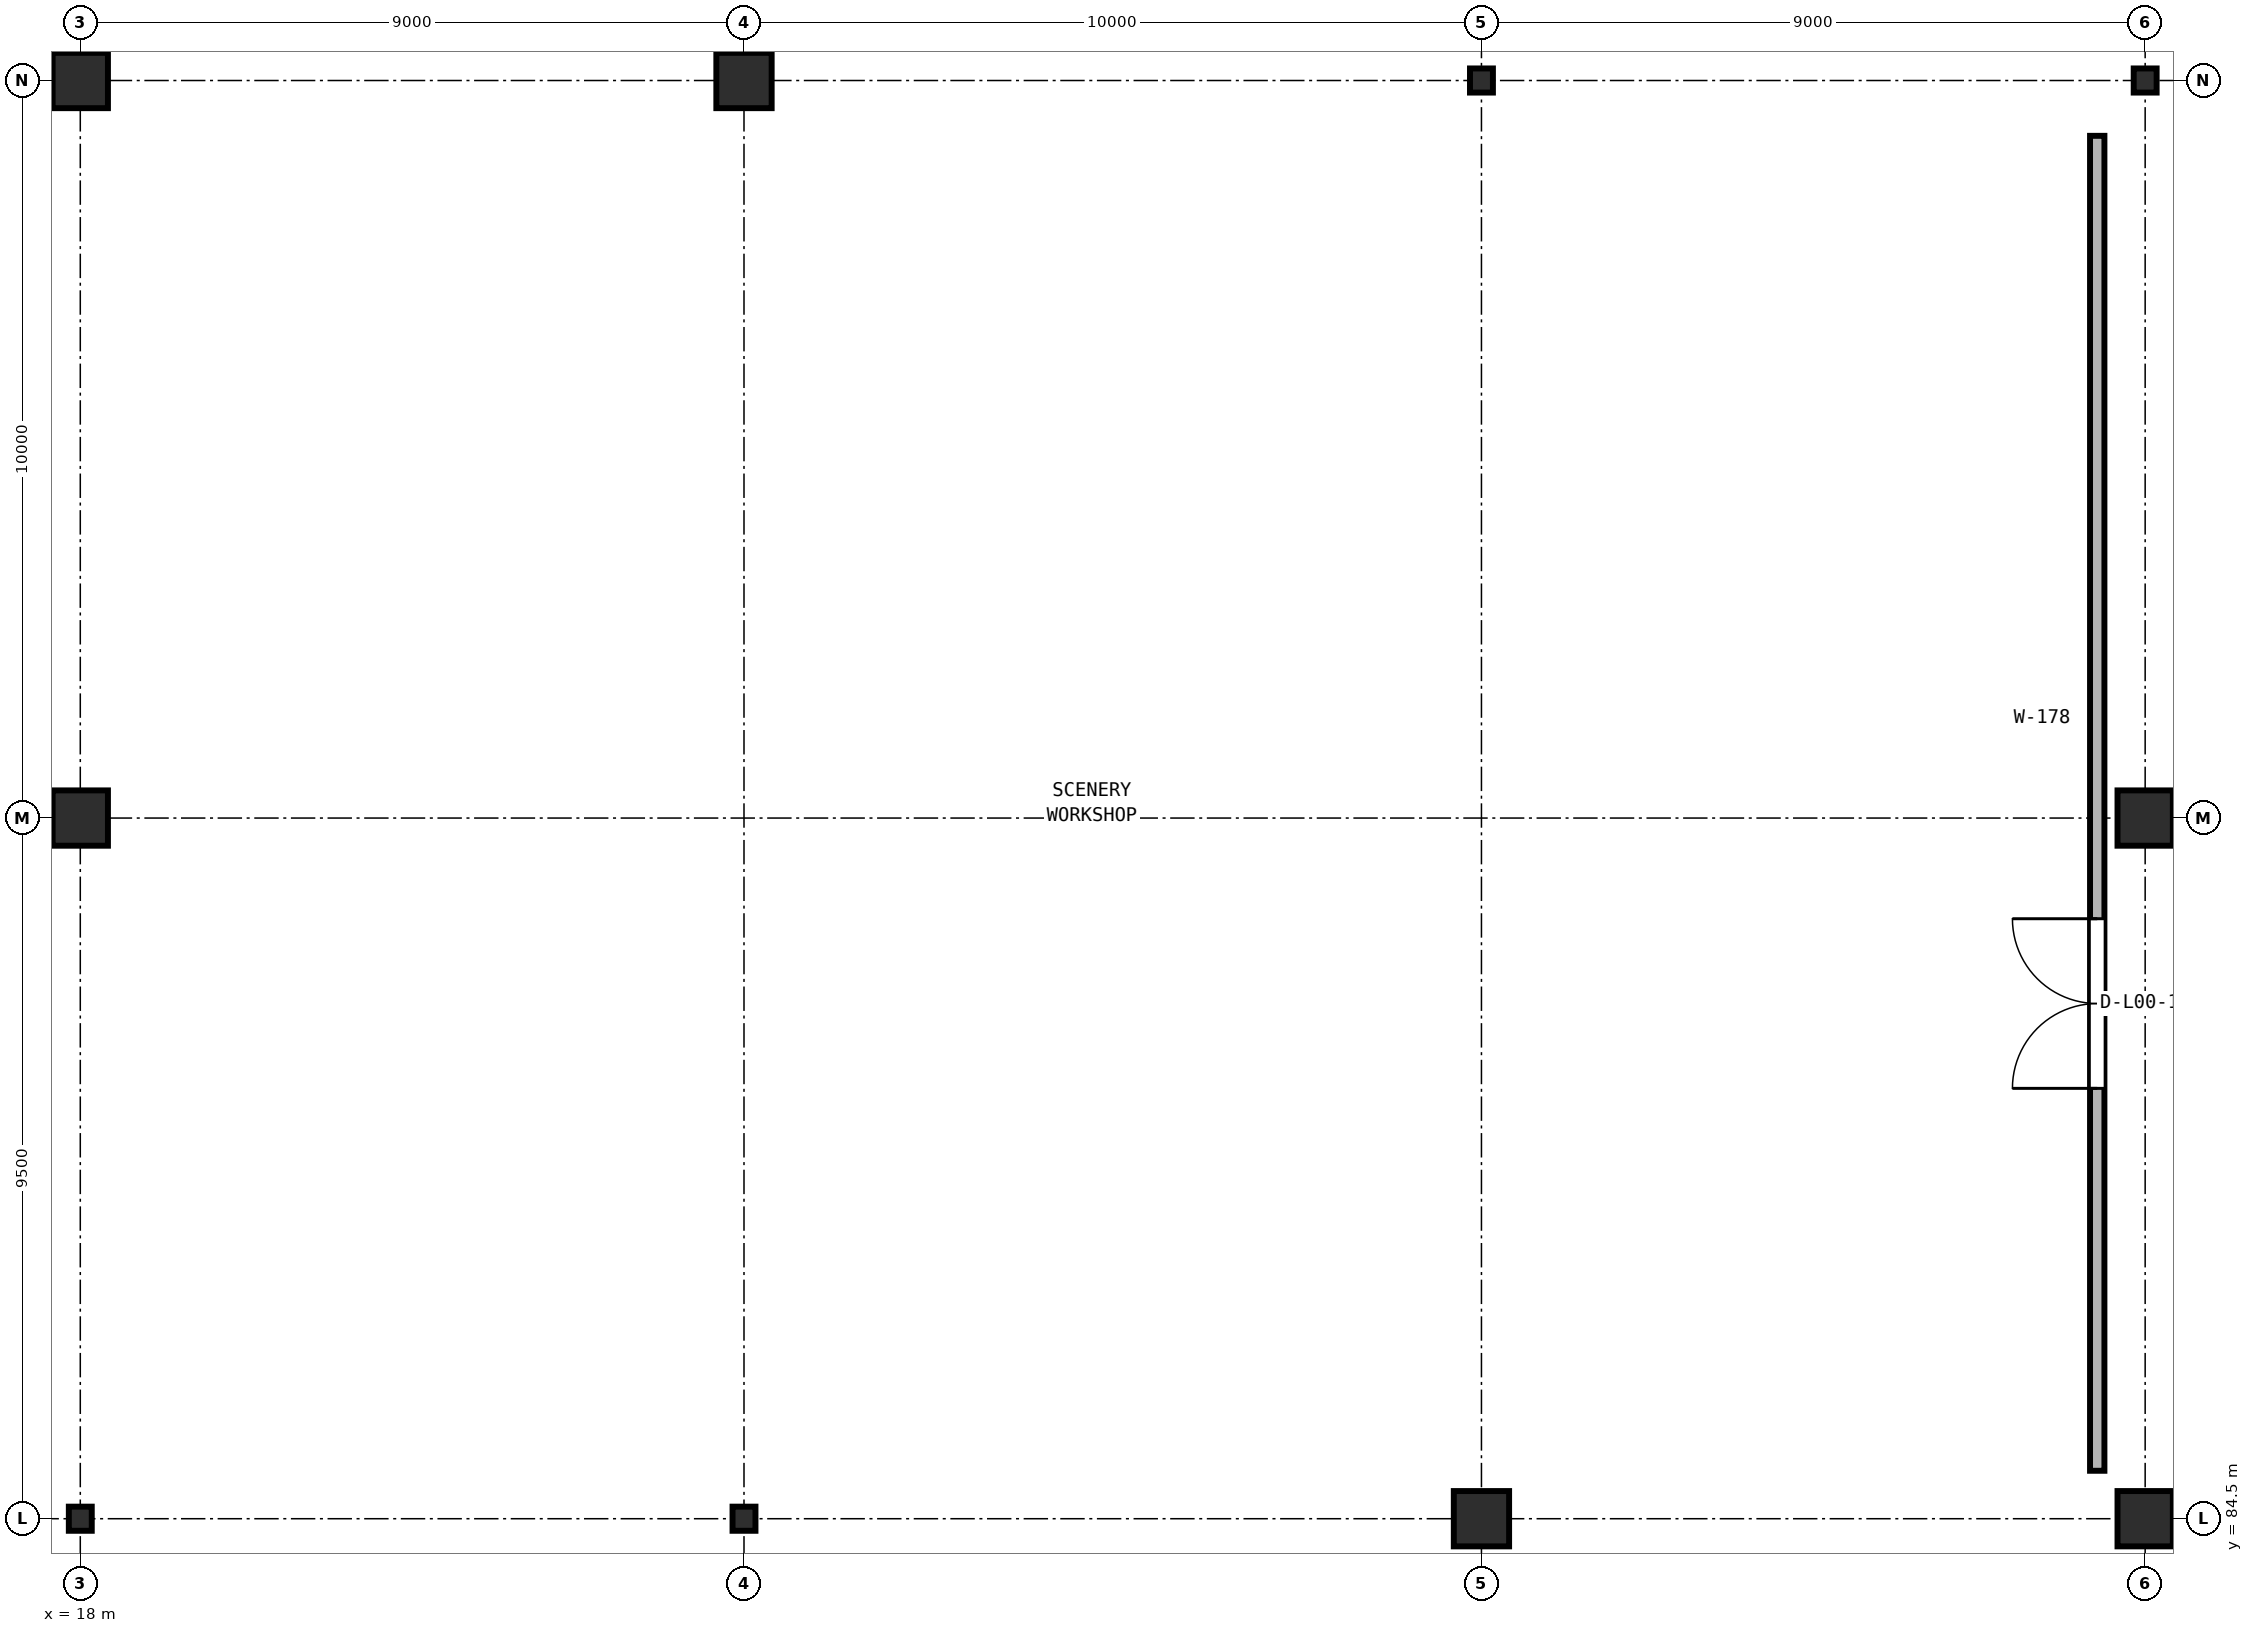
"""IFC4 building model, lengths in metres.
Left out: names, types, materials, properties, quantities, classifications, styles, units other than length and angle.
Written with IfcOpenShell. Run it as: python <this file> out.ifc"""

import sys

from ifc_helpers import new_model, si_unit, direction, frame, frame_2d, origin, origin_2d, place, context, subcontext, project, spatial, rectangle, i_section, extrude, element, fill, save


model = new_model("IFC4")
c1 = context("Model", 3, precision=1e-05, world=origin(), true_north=direction((0.0, 1.0)))
c2 = subcontext(c1, "Body", "Model", "MODEL_VIEW")
j1 = project(units=[si_unit("LENGTHUNIT", "METRE"), si_unit("PLANEANGLEUNIT", "RADIAN")], contexts=[c1])
p1 = place(None, origin())
s1 = spatial("IfcSite", under=j1, at=p1, CompositionType="ELEMENT")
p2 = place(p1, origin())
s2 = spatial("IfcBuilding", under=s1, at=p2, CompositionType="ELEMENT")
p3 = place(p2, origin())
s3 = spatial("IfcBuildingStorey", under=s2, at=p3, CompositionType="ELEMENT", Elevation=0.0)
p4 = place(p3, frame((18.0, 84.5, 0.0), z_axis=(0.0, 0.0, 1.0), x_axis=(1.0, 0.0, 0.0)))
e1 = element("IfcColumn", 1, at=p4, inside=s3, PredefinedType="COLUMN", context=c2, shape_type="SweptSolid", body=[
    extrude(i_section(OverallWidth=0.311, OverallDepth=0.327, WebThickness=0.016, FlangeThickness=0.025, FilletRadius=0.017, at=origin_2d()), origin(), (0.0, 0.0, 1.0), 5.12),
])
for number, where, z_axis, x_axis in (
    (2, (18.0, 94.0, 0.0), (0.0, 0.0, 1.0), (1.0, 0.0, 0.0)),
    (3, (18.0, 104.0, 0.0), (0.0, 0.0, 1.0), (1.0, 0.0, 0.0)),
):
    element("IfcColumn", number, at=place(p3, frame(where, z_axis=z_axis, x_axis=x_axis)), inside=s3, PredefinedType="COLUMN", context=c2, shape_type="SweptSolid", body=[
        extrude(rectangle(XDim=0.75, YDim=0.75, at=origin_2d()), origin(), (0.0, 0.0, 1.0), 5.12),
    ])
p5 = place(p3, frame((27.0, 84.5, 0.0), z_axis=(0.0, 0.0, 1.0), x_axis=(1.0, 0.0, 0.0)))
e4 = element("IfcColumn", 4, at=p5, inside=s3, PredefinedType="COLUMN", context=c2, shape_type="SweptSolid", body=[
    extrude(i_section(OverallWidth=0.311, OverallDepth=0.327, WebThickness=0.016, FlangeThickness=0.025, FilletRadius=0.017, at=origin_2d()), origin(), (0.0, 0.0, 1.0), 5.12),
])
for number, where, z_axis, x_axis in (
    (5, (27.0, 104.0, 0.0), (0.0, 0.0, 1.0), (1.0, 0.0, 0.0)),
    (6, (37.0, 84.5, 0.0), (0.0, 0.0, 1.0), (1.0, 0.0, 0.0)),
):
    element("IfcColumn", number, at=place(p3, frame(where, z_axis=z_axis, x_axis=x_axis)), inside=s3, PredefinedType="COLUMN", context=c2, shape_type="SweptSolid", body=[
        extrude(rectangle(XDim=0.75, YDim=0.75, at=origin_2d()), origin(), (0.0, 0.0, 1.0), 5.12),
    ])
p6 = place(p3, frame((37.0, 104.0, 0.0), z_axis=(0.0, 0.0, 1.0), x_axis=(1.0, 0.0, 0.0)))
e7 = element("IfcColumn", 7, at=p6, inside=s3, PredefinedType="COLUMN", context=c2, shape_type="SweptSolid", body=[
    extrude(i_section(OverallWidth=0.311, OverallDepth=0.327, WebThickness=0.016, FlangeThickness=0.025, FilletRadius=0.017, at=origin_2d()), origin(), (0.0, 0.0, 1.0), 5.12),
])
for number, where, z_axis, x_axis in (
    (8, (46.0, 84.5, 0.0), (0.0, 0.0, 1.0), (1.0, 0.0, 0.0)),
    (9, (46.0, 94.0, 0.0), (0.0, 0.0, 1.0), (1.0, 0.0, 0.0)),
):
    element("IfcColumn", number, at=place(p3, frame(where, z_axis=z_axis, x_axis=x_axis)), inside=s3, PredefinedType="COLUMN", context=c2, shape_type="SweptSolid", body=[
        extrude(rectangle(XDim=0.75, YDim=0.75, at=origin_2d()), origin(), (0.0, 0.0, 1.0), 5.12),
    ])
p7 = place(p3, frame((46.0, 104.0, 0.0), z_axis=(0.0, 0.0, 1.0), x_axis=(1.0, 0.0, 0.0)))
e10 = element("IfcColumn", 10, at=p7, inside=s3, PredefinedType="COLUMN", context=c2, shape_type="SweptSolid", body=[
    extrude(i_section(OverallWidth=0.311, OverallDepth=0.327, WebThickness=0.016, FlangeThickness=0.025, FilletRadius=0.017, at=origin_2d()), origin(), (0.0, 0.0, 1.0), 5.12),
])
p8 = place(p3, frame((45.35, 85.15, 0.0), z_axis=(0.0, 0.0, 1.0), x_axis=(0.0, 1.0, 0.0)))
e11 = element("IfcWall", 11, at=p8, inside=s3, PredefinedType="PARTITIONING", context=c2, shape_type="SweptSolid", body=[
    extrude(rectangle(XDim=18.1, YDim=0.195, at=frame_2d((9.05, 0.0))), origin(), (0.0, 0.0, 1.0), 5.07),
])
p9 = place(p8, frame((5.185, 0.0, 0.0)))
e12 = element("IfcOpeningElement", 12, at=p9, cuts=e11, PredefinedType="OPENING", context=c2, shape_type="SweptSolid", body=[
    extrude(rectangle(XDim=2.3, YDim=2.52, at=frame_2d((1.15, 1.26))), frame((0.0, 0.107, 0.0), z_axis=(0.0, -1.0, 0.0), x_axis=(1.0, 0.0, 0.0)), (0.0, 0.0, 1.0), 0.215),
])
p10 = place(p9, origin())
e13 = element("IfcDoor", 13, at=p10, inside=s3, OperationType="DOUBLE_DOOR_SINGLE_SWING", PredefinedType="DOOR", context=c2, shape_type="SweptSolid", body=[
    extrude(rectangle(XDim=2.3, YDim=2.52, at=frame_2d((1.15, 1.26))), frame((0.0, 0.025, 0.0), z_axis=(0.0, -1.0, 0.0), x_axis=(1.0, 0.0, 0.0)), (0.0, 0.0, 1.0), 0.05),
])
fill(e12, e13)
save(model, sys.argv[1])
